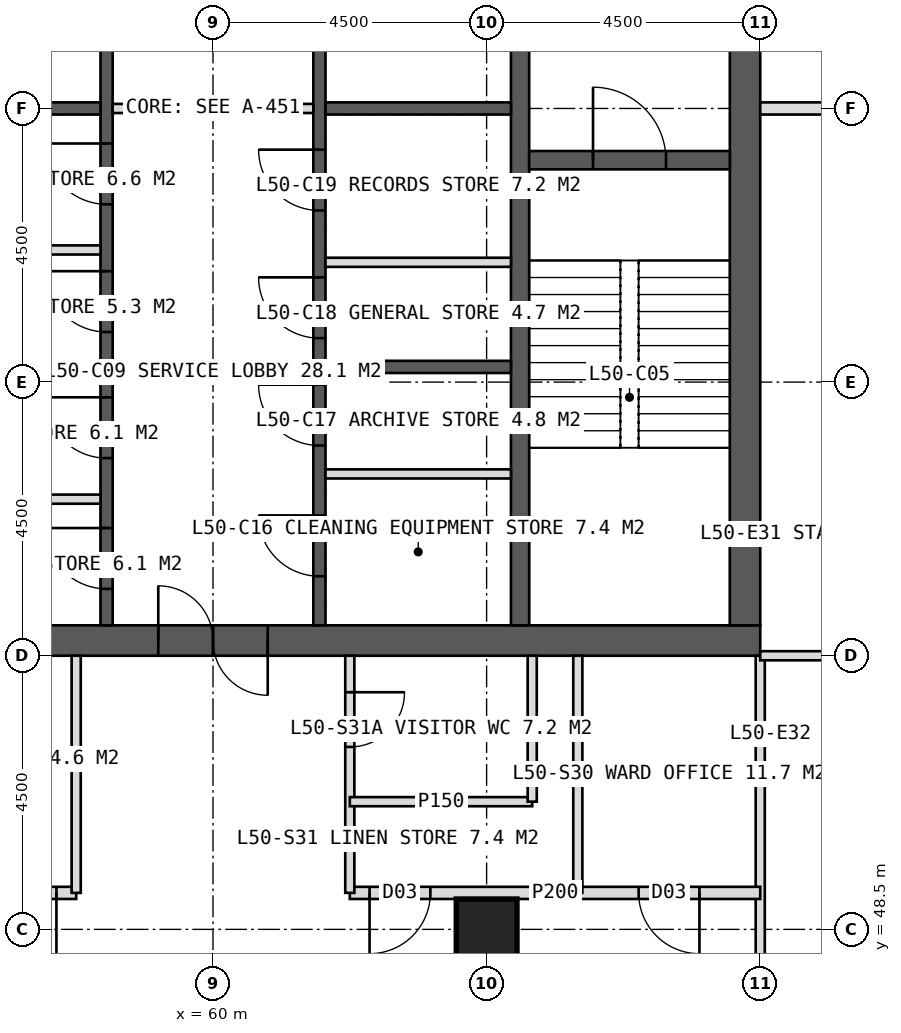
"""IFC4 building model, lengths in metres.
Left out: names, types, materials, properties, quantities, classifications, styles, units other than length and angle.
Written with IfcOpenShell. Run it as: python <this file> out.ifc"""

import sys

from ifc_helpers import new_model, si_unit, direction, frame, frame_2d, origin, origin_2d, place, context, subcontext, project, spatial, rectangle, hollow_rectangle, extrude, element, fill, save


model = new_model("IFC4")
c1 = context("Model", 3, precision=1e-05, world=origin(), true_north=direction((0.0, 1.0)))
c2 = subcontext(c1, "Body", "Model", "MODEL_VIEW")
j1 = project(units=[si_unit("LENGTHUNIT", "METRE"), si_unit("PLANEANGLEUNIT", "RADIAN")], contexts=[c1])
p1 = place(None, origin())
s1 = spatial("IfcSite", under=j1, at=p1, CompositionType="ELEMENT")
p2 = place(p1, origin())
s2 = spatial("IfcBuilding", under=s1, at=p2, CompositionType="ELEMENT")
p3 = place(p2, frame((0.0, 0.0, 209.0)))
s3 = spatial("IfcBuildingStorey", under=s2, at=p3, CompositionType="ELEMENT", Elevation=209.0)
p4 = place(p3, frame((51.0, 53.25, 0.0), z_axis=(0.0, 0.0, 1.0), x_axis=(1.0, 0.0, 0.0)))
e1 = element("IfcWall", 1, at=p4, inside=s3, PredefinedType="SHEAR", context=c2, shape_type="SweptSolid", body=[
    extrude(rectangle(XDim=18.0, YDim=0.5, at=frame_2d((9.0, 0.0))), origin(), (0.0, 0.0, 1.0), 4.0),
])
p5 = place(p4, frame((8.1, 0.0, 0.0)))
e2 = element("IfcOpeningElement", 2, at=p5, cuts=e1, PredefinedType="OPENING", context=c2, shape_type="SweptSolid", body=[
    extrude(rectangle(XDim=1.8, YDim=2.2, at=frame_2d((0.9, 1.1))), frame((0.0, 0.26, 0.0), z_axis=(0.0, -1.0, 0.0), x_axis=(1.0, 0.0, 0.0)), (0.0, 0.0, 1.0), 0.52),
])
p6 = place(p3, frame((68.75, 53.5, 0.0), z_axis=(0.0, 0.0, 1.0), x_axis=(0.0, 1.0, 0.0)))
e3 = element("IfcWall", 3, at=p6, inside=s3, PredefinedType="SHEAR", context=c2, shape_type="SweptSolid", body=[
    extrude(rectangle(XDim=17.0, YDim=0.5, at=frame_2d((8.5, 0.0))), origin(), (0.0, 0.0, 1.0), 4.0),
])
p7 = place(p6, frame((9.6, 0.0, 0.0)))
e4 = element("IfcOpeningElement", 4, at=p7, cuts=e3, PredefinedType="OPENING", context=c2, shape_type="SweptSolid", body=[
    extrude(rectangle(XDim=1.5, YDim=2.2, at=frame_2d((0.75, 1.1))), frame((0.0, 0.26, 0.0), z_axis=(0.0, -1.0, 0.0), x_axis=(1.0, 0.0, 0.0)), (0.0, 0.0, 1.0), 0.52),
])
p8 = place(p3, frame((65.05, 53.5, 0.0), z_axis=(0.0, 0.0, 1.0), x_axis=(0.0, 1.0, 0.0)))
e5 = element("IfcWall", 5, at=p8, inside=s3, PredefinedType="SHEAR", context=c2, shape_type="SweptSolid", body=[
    extrude(rectangle(XDim=17.0, YDim=0.3, at=frame_2d((8.5, 0.0))), origin(), (0.0, 0.0, 1.0), 4.0),
])
p9 = place(p3, frame((58.25, 53.5, 0.0), z_axis=(0.0, 0.0, 1.0), x_axis=(0.0, 1.0, 0.0)))
e6 = element("IfcWall", 6, at=p9, inside=s3, PredefinedType="SHEAR", context=c2, shape_type="SweptSolid", body=[
    extrude(rectangle(XDim=17.0, YDim=0.2, at=frame_2d((8.5, 0.0))), origin(), (0.0, 0.0, 1.0), 4.0),
])
p10 = place(p9, frame((0.6, 0.0, 0.0)))
e7 = element("IfcOpeningElement", 7, at=p10, cuts=e6, PredefinedType="OPENING", context=c2, shape_type="SweptSolid", body=[
    extrude(rectangle(XDim=1.0, YDim=2.1, at=frame_2d((0.5, 1.05))), frame((0.0, 0.11, 0.0), z_axis=(0.0, -1.0, 0.0), x_axis=(1.0, 0.0, 0.0)), (0.0, 0.0, 1.0), 0.22),
])
p11 = place(p9, frame((2.75, 0.0, 0.0)))
e8 = element("IfcOpeningElement", 8, at=p11, cuts=e6, PredefinedType="OPENING", context=c2, shape_type="SweptSolid", body=[
    extrude(rectangle(XDim=1.0, YDim=2.1, at=frame_2d((0.5, 1.05))), frame((0.0, 0.11, 0.0), z_axis=(0.0, -1.0, 0.0), x_axis=(1.0, 0.0, 0.0)), (0.0, 0.0, 1.0), 0.22),
])
p12 = place(p9, frame((4.824, 0.0, 0.0)))
e9 = element("IfcOpeningElement", 9, at=p12, cuts=e6, PredefinedType="OPENING", context=c2, shape_type="SweptSolid", body=[
    extrude(rectangle(XDim=1.0, YDim=2.1, at=frame_2d((0.5, 1.05))), frame((0.0, 0.11, 0.0), z_axis=(0.0, -1.0, 0.0), x_axis=(1.0, 0.0, 0.0)), (0.0, 0.0, 1.0), 0.22),
])
p13 = place(p9, frame((6.924, 0.0, 0.0)))
e10 = element("IfcOpeningElement", 10, at=p13, cuts=e6, PredefinedType="OPENING", context=c2, shape_type="SweptSolid", body=[
    extrude(rectangle(XDim=1.0, YDim=2.1, at=frame_2d((0.5, 1.05))), frame((0.0, 0.11, 0.0), z_axis=(0.0, -1.0, 0.0), x_axis=(1.0, 0.0, 0.0)), (0.0, 0.0, 1.0), 0.22),
])
p14 = place(p9, frame((10.025, 0.0, 0.0)))
e11 = element("IfcOpeningElement", 11, at=p14, cuts=e6, PredefinedType="OPENING", context=c2, shape_type="SweptSolid", body=[
    extrude(rectangle(XDim=1.4, YDim=2.2, at=frame_2d((0.7, 1.1))), frame((0.0, 0.11, 0.0), z_axis=(0.0, -1.0, 0.0), x_axis=(1.0, 0.0, 0.0)), (0.0, 0.0, 1.0), 0.22),
])
p15 = place(p9, frame((14.325, 0.0, 0.0)))
e12 = element("IfcOpeningElement", 12, at=p15, cuts=e6, PredefinedType="OPENING", context=c2, shape_type="SweptSolid", body=[
    extrude(rectangle(XDim=1.4, YDim=2.2, at=frame_2d((0.7, 1.1))), frame((0.0, 0.11, 0.0), z_axis=(0.0, -1.0, 0.0), x_axis=(1.0, 0.0, 0.0)), (0.0, 0.0, 1.0), 0.22),
])
p16 = place(p3, frame((61.75, 53.5, 0.0), z_axis=(0.0, 0.0, 1.0), x_axis=(0.0, 1.0, 0.0)))
e13 = element("IfcWall", 13, at=p16, inside=s3, PredefinedType="SHEAR", context=c2, shape_type="SweptSolid", body=[
    extrude(rectangle(XDim=17.0, YDim=0.2, at=frame_2d((8.5, 0.0))), origin(), (0.0, 0.0, 1.0), 4.0),
])
p17 = place(p16, frame((0.808, 0.0, 0.0)))
e14 = element("IfcOpeningElement", 14, at=p17, cuts=e13, PredefinedType="OPENING", context=c2, shape_type="SweptSolid", body=[
    extrude(rectangle(XDim=1.0, YDim=2.1, at=frame_2d((0.5, 1.05))), frame((0.0, 0.11, 0.0), z_axis=(0.0, -1.0, 0.0), x_axis=(1.0, 0.0, 0.0)), (0.0, 0.0, 1.0), 0.22),
])
p18 = place(p16, frame((2.958, 0.0, 0.0)))
e15 = element("IfcOpeningElement", 15, at=p18, cuts=e13, PredefinedType="OPENING", context=c2, shape_type="SweptSolid", body=[
    extrude(rectangle(XDim=1.0, YDim=2.1, at=frame_2d((0.5, 1.05))), frame((0.0, 0.11, 0.0), z_axis=(0.0, -1.0, 0.0), x_axis=(1.0, 0.0, 0.0)), (0.0, 0.0, 1.0), 0.22),
])
p19 = place(p16, frame((4.722, 0.0, 0.0)))
e16 = element("IfcOpeningElement", 16, at=p19, cuts=e13, PredefinedType="OPENING", context=c2, shape_type="SweptSolid", body=[
    extrude(rectangle(XDim=1.0, YDim=2.1, at=frame_2d((0.5, 1.05))), frame((0.0, 0.11, 0.0), z_axis=(0.0, -1.0, 0.0), x_axis=(1.0, 0.0, 0.0)), (0.0, 0.0, 1.0), 0.22),
])
p20 = place(p16, frame((6.823, 0.0, 0.0)))
e17 = element("IfcOpeningElement", 17, at=p20, cuts=e13, PredefinedType="OPENING", context=c2, shape_type="SweptSolid", body=[
    extrude(rectangle(XDim=1.0, YDim=2.1, at=frame_2d((0.5, 1.05))), frame((0.0, 0.11, 0.0), z_axis=(0.0, -1.0, 0.0), x_axis=(1.0, 0.0, 0.0)), (0.0, 0.0, 1.0), 0.22),
])
p21 = place(p16, frame((10.025, 0.0, 0.0)))
e18 = element("IfcOpeningElement", 18, at=p21, cuts=e13, PredefinedType="OPENING", context=c2, shape_type="SweptSolid", body=[
    extrude(rectangle(XDim=1.4, YDim=2.2, at=frame_2d((0.7, 1.1))), frame((0.0, 0.11, 0.0), z_axis=(0.0, -1.0, 0.0), x_axis=(1.0, 0.0, 0.0)), (0.0, 0.0, 1.0), 0.22),
])
p22 = place(p16, frame((14.325, 0.0, 0.0)))
e19 = element("IfcOpeningElement", 19, at=p22, cuts=e13, PredefinedType="OPENING", context=c2, shape_type="SweptSolid", body=[
    extrude(rectangle(XDim=1.4, YDim=2.2, at=frame_2d((0.7, 1.1))), frame((0.0, 0.11, 0.0), z_axis=(0.0, -1.0, 0.0), x_axis=(1.0, 0.0, 0.0)), (0.0, 0.0, 1.0), 0.22),
])
for number, where, z_axis, x_axis in (
    (20, (55.1, 57.75, 0.0), (0.0, 0.0, 1.0), (1.0, 0.0, 0.0)),
    (21, (61.85, 57.75, 0.0), (0.0, 0.0, 1.0), (1.0, 0.0, 0.0)),
    (22, (55.1, 62.0, 0.0), (0.0, 0.0, 1.0), (1.0, 0.0, 0.0)),
    (23, (61.85, 62.0, 0.0), (0.0, 0.0, 1.0), (1.0, 0.0, 0.0)),
):
    element("IfcWall", number, at=place(p3, frame(where, z_axis=z_axis, x_axis=x_axis)), inside=s3, PredefinedType="SHEAR", context=c2, shape_type="SweptSolid", body=[
        extrude(rectangle(XDim=3.05, YDim=0.2, at=frame_2d((1.525, 0.0))), origin(), (0.0, 0.0, 1.0), 4.0),
    ])
p23 = place(p3, frame((65.2, 61.15, 0.0), z_axis=(0.0, 0.0, 1.0), x_axis=(1.0, 0.0, 0.0)))
e24 = element("IfcWall", 24, at=p23, inside=s3, PredefinedType="SHEAR", context=c2, shape_type="SweptSolid", body=[
    extrude(rectangle(XDim=3.3, YDim=0.3, at=frame_2d((1.65, 0.0))), origin(), (0.0, 0.0, 1.0), 4.0),
])
p24 = place(p23, frame((1.05, 0.0, 0.0)))
e25 = element("IfcOpeningElement", 25, at=p24, cuts=e24, PredefinedType="OPENING", context=c2, shape_type="SweptSolid", body=[
    extrude(rectangle(XDim=1.2, YDim=2.1, at=frame_2d((0.6, 1.05))), frame((0.0, 0.16, 0.0), z_axis=(0.0, -1.0, 0.0), x_axis=(1.0, 0.0, 0.0)), (0.0, 0.0, 1.0), 0.32),
])
p25 = place(p3, frame((64.5, 48.5, 0.0), z_axis=(0.0, 0.0, 1.0), x_axis=(1.0, 0.0, 0.0)))
e26 = element("IfcColumn", 26, at=p25, inside=s3, PredefinedType="COLUMN", context=c2, shape_type="SweptSolid", body=[
    extrude(hollow_rectangle(XDim=1.0, YDim=1.0, WallThickness=0.1, at=origin_2d()), origin(), (0.0, 0.0, 1.0), 4.0),
])
p26 = place(p3, frame((69.0, 53.0, 0.0), z_axis=(0.0, 0.0, 1.0), x_axis=(0.0, -1.0, 0.0)))
e27 = element("IfcWall", 27, at=p26, inside=s3, PredefinedType="PARTITIONING", context=c2, shape_type="SweptSolid", body=[
    extrude(rectangle(XDim=5.7, YDim=0.15, at=frame_2d((2.85, 0.0))), origin(), (0.0, 0.0, 1.0), 3.75),
])
p27 = place(p3, frame((69.0, 49.1, 0.0), z_axis=(0.0, 0.0, 1.0), x_axis=(-1.0, 0.0, 0.0)))
e28 = element("IfcWall", 28, at=p27, inside=s3, PredefinedType="PARTITIONING", context=c2, shape_type="SweptSolid", body=[
    extrude(rectangle(XDim=6.75, YDim=0.2, at=frame_2d((3.375, 0.0))), origin(), (0.0, 0.0, 1.0), 3.75),
])
p28 = place(p27, frame((1.0, 0.0, 0.0)))
e29 = element("IfcOpeningElement", 29, at=p28, cuts=e28, PredefinedType="OPENING", context=c2, shape_type="SweptSolid", body=[
    extrude(rectangle(XDim=1.0, YDim=2.1, at=frame_2d((0.5, 1.05))), frame((0.0, 0.11, 0.0), z_axis=(0.0, -1.0, 0.0), x_axis=(1.0, 0.0, 0.0)), (0.0, 0.0, 1.0), 0.22),
])
p29 = place(p27, frame((5.425, 0.0, 0.0)))
e30 = element("IfcOpeningElement", 30, at=p29, cuts=e28, PredefinedType="OPENING", context=c2, shape_type="SweptSolid", body=[
    extrude(rectangle(XDim=1.0, YDim=2.1, at=frame_2d((0.5, 1.05))), frame((0.0, 0.11, 0.0), z_axis=(0.0, -1.0, 0.0), x_axis=(1.0, 0.0, 0.0)), (0.0, 0.0, 1.0), 0.22),
])
p30 = place(p3, frame((57.75, 49.1, 0.0), z_axis=(0.0, 0.0, 1.0), x_axis=(-1.0, 0.0, 0.0)))
e31 = element("IfcWall", 31, at=p30, inside=s3, PredefinedType="PARTITIONING", context=c2, shape_type="SweptSolid", body=[
    extrude(rectangle(XDim=12.45, YDim=0.2, at=frame_2d((6.225, 0.0))), origin(), (0.0, 0.0, 1.0), 3.75),
])
p31 = place(p30, frame((0.325, 0.0, 0.0)))
e32 = element("IfcOpeningElement", 32, at=p31, cuts=e31, PredefinedType="OPENING", context=c2, shape_type="SweptSolid", body=[
    extrude(rectangle(XDim=1.0, YDim=2.1, at=frame_2d((0.5, 1.05))), frame((0.0, 0.11, 0.0), z_axis=(0.0, -1.0, 0.0), x_axis=(1.0, 0.0, 0.0)), (0.0, 0.0, 1.0), 0.22),
])
p32 = place(p30, frame((4.75, 0.0, 0.0)))
e33 = element("IfcOpeningElement", 33, at=p32, cuts=e31, PredefinedType="OPENING", context=c2, shape_type="SweptSolid", body=[
    extrude(rectangle(XDim=1.0, YDim=2.1, at=frame_2d((0.5, 1.05))), frame((0.0, 0.11, 0.0), z_axis=(0.0, -1.0, 0.0), x_axis=(1.0, 0.0, 0.0)), (0.0, 0.0, 1.0), 0.22),
])
p33 = place(p30, frame((9.1, 0.0, 0.0)))
e34 = element("IfcOpeningElement", 34, at=p33, cuts=e31, PredefinedType="OPENING", context=c2, shape_type="SweptSolid", body=[
    extrude(rectangle(XDim=1.0, YDim=2.1, at=frame_2d((0.5, 1.05))), frame((0.0, 0.11, 0.0), z_axis=(0.0, -1.0, 0.0), x_axis=(1.0, 0.0, 0.0)), (0.0, 0.0, 1.0), 0.22),
])
p34 = place(p3, frame((62.25, 53.0, 0.0), z_axis=(0.0, 0.0, 1.0), x_axis=(0.0, -1.0, 0.0)))
e35 = element("IfcWall", 35, at=p34, inside=s3, PredefinedType="PARTITIONING", context=c2, shape_type="SweptSolid", body=[
    extrude(rectangle(XDim=3.9, YDim=0.15, at=frame_2d((1.95, 0.0))), origin(), (0.0, 0.0, 1.0), 3.75),
])
p35 = place(p34, frame((0.6, 0.0, 0.0)))
e36 = element("IfcOpeningElement", 36, at=p35, cuts=e35, PredefinedType="OPENING", context=c2, shape_type="SweptSolid", body=[
    extrude(rectangle(XDim=0.9, YDim=2.1, at=frame_2d((0.45, 1.05))), frame((0.0, 0.085, 0.0), z_axis=(0.0, -1.0, 0.0), x_axis=(1.0, 0.0, 0.0)), (0.0, 0.0, 1.0), 0.17),
])
for number, where, z_axis, x_axis in (
    (37, (57.75, 53.0, 0.0), (0.0, 0.0, 1.0), (0.0, -1.0, 0.0)),
    (38, (66.0, 53.0, 0.0), (0.0, 0.0, 1.0), (0.0, -1.0, 0.0)),
):
    element("IfcWall", number, at=place(p3, frame(where, z_axis=z_axis, x_axis=x_axis)), inside=s3, PredefinedType="PARTITIONING", context=c2, shape_type="SweptSolid", body=[
        extrude(rectangle(XDim=3.9, YDim=0.15, at=frame_2d((1.95, 0.0))), origin(), (0.0, 0.0, 1.0), 3.75),
    ])
p36 = place(p3, frame((65.25, 50.6, 0.0), z_axis=(0.0, 0.0, 1.0), x_axis=(-1.0, 0.0, 0.0)))
e39 = element("IfcWall", 39, at=p36, inside=s3, PredefinedType="PARTITIONING", context=c2, shape_type="SweptSolid", body=[
    extrude(rectangle(XDim=3.0, YDim=0.15, at=frame_2d((1.5, 0.0))), origin(), (0.0, 0.0, 1.0), 3.75),
])
p37 = place(p3, frame((65.25, 53.0, 0.0), z_axis=(0.0, 0.0, 1.0), x_axis=(0.0, -1.0, 0.0)))
e40 = element("IfcWall", 40, at=p37, inside=s3, PredefinedType="PARTITIONING", context=c2, shape_type="SweptSolid", body=[
    extrude(rectangle(XDim=2.4, YDim=0.15, at=frame_2d((1.2, 0.0))), origin(), (0.0, 0.0, 1.0), 3.75),
])
p38 = place(p3, frame((69.0, 62.0, 0.0), z_axis=(0.0, 0.0, 1.0), x_axis=(1.0, 0.0, 0.0)))
e41 = element("IfcWall", 41, at=p38, inside=s3, PredefinedType="SOLIDWALL", context=c2, shape_type="SweptSolid", body=[
    extrude(rectangle(XDim=5.7, YDim=0.2, at=frame_2d((2.85, 0.0))), origin(), (0.0, 0.0, 1.0), 2.95),
])
p39 = place(p3, frame((69.0, 53.0, 0.0), z_axis=(0.0, 0.0, 1.0), x_axis=(1.0, 0.0, 0.0)))
e42 = element("IfcWall", 42, at=p39, inside=s3, PredefinedType="PARTITIONING", context=c2, shape_type="SweptSolid", body=[
    extrude(rectangle(XDim=5.7, YDim=0.15, at=frame_2d((2.85, 0.0))), origin(), (0.0, 0.0, 1.0), 3.75),
])
for number, where, z_axis, x_axis in (
    (43, (55.1, 55.575, 0.0), (0.0, 0.0, 1.0), (1.0, 0.0, 0.0)),
    (44, (61.85, 55.99, 0.0), (0.0, 0.0, 1.0), (1.0, 0.0, 0.0)),
    (45, (55.1, 59.673, 0.0), (0.0, 0.0, 1.0), (1.0, 0.0, 0.0)),
    (46, (61.85, 59.47, 0.0), (0.0, 0.0, 1.0), (1.0, 0.0, 0.0)),
):
    element("IfcWall", number, at=place(p3, frame(where, z_axis=z_axis, x_axis=x_axis)), inside=s3, PredefinedType="PARTITIONING", context=c2, shape_type="SweptSolid", body=[
        extrude(rectangle(XDim=3.05, YDim=0.15, at=frame_2d((1.525, 0.0))), origin(), (0.0, 0.0, 1.0), 3.75),
    ])
p40 = place(p3, frame((58.35, 62.0, 0.0), z_axis=(0.0, 0.0, 1.0), x_axis=(1.0, 0.0, 0.0)))
e47 = element("IfcWall", 47, at=p40, inside=s3, PredefinedType="PARTITIONING", context=c2, shape_type="SweptSolid", body=[
    extrude(rectangle(XDim=3.3, YDim=0.15, at=frame_2d((1.65, 0.0))), origin(), (0.0, 0.0, 1.0), 3.75),
])
p41 = place(p28, origin())
e48 = element("IfcDoor", 48, at=p41, inside=s3, OperationType="SINGLE_SWING_LEFT", PredefinedType="DOOR", context=c2, shape_type="SweptSolid", body=[
    extrude(rectangle(XDim=1.0, YDim=2.1, at=frame_2d((0.5, 1.05))), frame((0.0, 0.025, 0.0), z_axis=(0.0, -1.0, 0.0), x_axis=(1.0, 0.0, 0.0)), (0.0, 0.0, 1.0), 0.05),
])
fill(e29, e48)
p42 = place(p35, origin())
e49 = element("IfcDoor", 49, at=p42, inside=s3, OperationType="SINGLE_SWING_LEFT", PredefinedType="DOOR", context=c2, shape_type="SweptSolid", body=[
    extrude(rectangle(XDim=0.9, YDim=2.1, at=frame_2d((0.45, 1.05))), frame((0.0, 0.025, 0.0), z_axis=(0.0, -1.0, 0.0), x_axis=(1.0, 0.0, 0.0)), (0.0, 0.0, 1.0), 0.05),
])
fill(e36, e49)
p43 = place(p29, origin())
e50 = element("IfcDoor", 50, at=p43, inside=s3, OperationType="SINGLE_SWING_RIGHT", PredefinedType="DOOR", context=c2, shape_type="SweptSolid", body=[
    extrude(rectangle(XDim=1.0, YDim=2.1, at=frame_2d((0.5, 1.05))), frame((0.0, 0.025, 0.0), z_axis=(0.0, -1.0, 0.0), x_axis=(1.0, 0.0, 0.0)), (0.0, 0.0, 1.0), 0.05),
])
fill(e30, e50)
p44 = place(p31, origin())
e51 = element("IfcDoor", 51, at=p44, inside=s3, OperationType="SINGLE_SWING_LEFT", PredefinedType="DOOR", context=c2, shape_type="SweptSolid", body=[
    extrude(rectangle(XDim=1.0, YDim=2.1, at=frame_2d((0.5, 1.05))), frame((0.0, 0.025, 0.0), z_axis=(0.0, -1.0, 0.0), x_axis=(1.0, 0.0, 0.0)), (0.0, 0.0, 1.0), 0.05),
])
fill(e32, e51)
p45 = place(p24, origin())
e52 = element("IfcDoor", 52, at=p45, inside=s3, OperationType="SINGLE_SWING_LEFT", PredefinedType="DOOR", context=c2, shape_type="SweptSolid", body=[
    extrude(rectangle(XDim=1.2, YDim=2.1, at=frame_2d((0.6, 1.05))), frame((0.0, 0.025, 0.0), z_axis=(0.0, -1.0, 0.0), x_axis=(1.0, 0.0, 0.0)), (0.0, 0.0, 1.0), 0.05),
])
fill(e25, e52)
p46 = place(p10, origin())
e53 = element("IfcDoor", 53, at=p46, inside=s3, OperationType="SINGLE_SWING_RIGHT", PredefinedType="DOOR", context=c2, shape_type="SweptSolid", body=[
    extrude(rectangle(XDim=1.0, YDim=2.1, at=frame_2d((0.5, 1.05))), frame((0.0, 0.025, 0.0), z_axis=(0.0, -1.0, 0.0), x_axis=(1.0, 0.0, 0.0)), (0.0, 0.0, 1.0), 0.05),
])
fill(e7, e53)
p47 = place(p11, origin())
e54 = element("IfcDoor", 54, at=p47, inside=s3, OperationType="SINGLE_SWING_RIGHT", PredefinedType="DOOR", context=c2, shape_type="SweptSolid", body=[
    extrude(rectangle(XDim=1.0, YDim=2.1, at=frame_2d((0.5, 1.05))), frame((0.0, 0.025, 0.0), z_axis=(0.0, -1.0, 0.0), x_axis=(1.0, 0.0, 0.0)), (0.0, 0.0, 1.0), 0.05),
])
fill(e8, e54)
p48 = place(p17, origin())
e55 = element("IfcDoor", 55, at=p48, inside=s3, OperationType="SINGLE_SWING_RIGHT", PredefinedType="DOOR", context=c2, shape_type="SweptSolid", body=[
    extrude(rectangle(XDim=1.0, YDim=2.1, at=frame_2d((0.5, 1.05))), frame((0.0, 0.025, 0.0), z_axis=(0.0, -1.0, 0.0), x_axis=(1.0, 0.0, 0.0)), (0.0, 0.0, 1.0), 0.05),
])
fill(e14, e55)
p49 = place(p18, origin())
e56 = element("IfcDoor", 56, at=p49, inside=s3, OperationType="SINGLE_SWING_RIGHT", PredefinedType="DOOR", context=c2, shape_type="SweptSolid", body=[
    extrude(rectangle(XDim=1.0, YDim=2.1, at=frame_2d((0.5, 1.05))), frame((0.0, 0.025, 0.0), z_axis=(0.0, -1.0, 0.0), x_axis=(1.0, 0.0, 0.0)), (0.0, 0.0, 1.0), 0.05),
])
fill(e15, e56)
p50 = place(p12, origin())
e57 = element("IfcDoor", 57, at=p50, inside=s3, OperationType="SINGLE_SWING_RIGHT", PredefinedType="DOOR", context=c2, shape_type="SweptSolid", body=[
    extrude(rectangle(XDim=1.0, YDim=2.1, at=frame_2d((0.5, 1.05))), frame((0.0, 0.025, 0.0), z_axis=(0.0, -1.0, 0.0), x_axis=(1.0, 0.0, 0.0)), (0.0, 0.0, 1.0), 0.05),
])
fill(e9, e57)
p51 = place(p13, origin())
e58 = element("IfcDoor", 58, at=p51, inside=s3, OperationType="SINGLE_SWING_RIGHT", PredefinedType="DOOR", context=c2, shape_type="SweptSolid", body=[
    extrude(rectangle(XDim=1.0, YDim=2.1, at=frame_2d((0.5, 1.05))), frame((0.0, 0.025, 0.0), z_axis=(0.0, -1.0, 0.0), x_axis=(1.0, 0.0, 0.0)), (0.0, 0.0, 1.0), 0.05),
])
fill(e10, e58)
p52 = place(p19, origin())
e59 = element("IfcDoor", 59, at=p52, inside=s3, OperationType="SINGLE_SWING_RIGHT", PredefinedType="DOOR", context=c2, shape_type="SweptSolid", body=[
    extrude(rectangle(XDim=1.0, YDim=2.1, at=frame_2d((0.5, 1.05))), frame((0.0, 0.025, 0.0), z_axis=(0.0, -1.0, 0.0), x_axis=(1.0, 0.0, 0.0)), (0.0, 0.0, 1.0), 0.05),
])
fill(e16, e59)
p53 = place(p20, origin())
e60 = element("IfcDoor", 60, at=p53, inside=s3, OperationType="SINGLE_SWING_RIGHT", PredefinedType="DOOR", context=c2, shape_type="SweptSolid", body=[
    extrude(rectangle(XDim=1.0, YDim=2.1, at=frame_2d((0.5, 1.05))), frame((0.0, 0.025, 0.0), z_axis=(0.0, -1.0, 0.0), x_axis=(1.0, 0.0, 0.0)), (0.0, 0.0, 1.0), 0.05),
])
fill(e17, e60)
p54 = place(p5, origin())
e61 = element("IfcDoor", 61, at=p54, inside=s3, OperationType="DOUBLE_DOOR_SINGLE_SWING", PredefinedType="DOOR", context=c2, shape_type="SweptSolid", body=[
    extrude(rectangle(XDim=1.8, YDim=2.2, at=frame_2d((0.9, 1.1))), frame((0.0, 0.025, 0.0), z_axis=(0.0, -1.0, 0.0), x_axis=(1.0, 0.0, 0.0)), (0.0, 0.0, 1.0), 0.05),
])
fill(e2, e61)
save(model, sys.argv[1])
